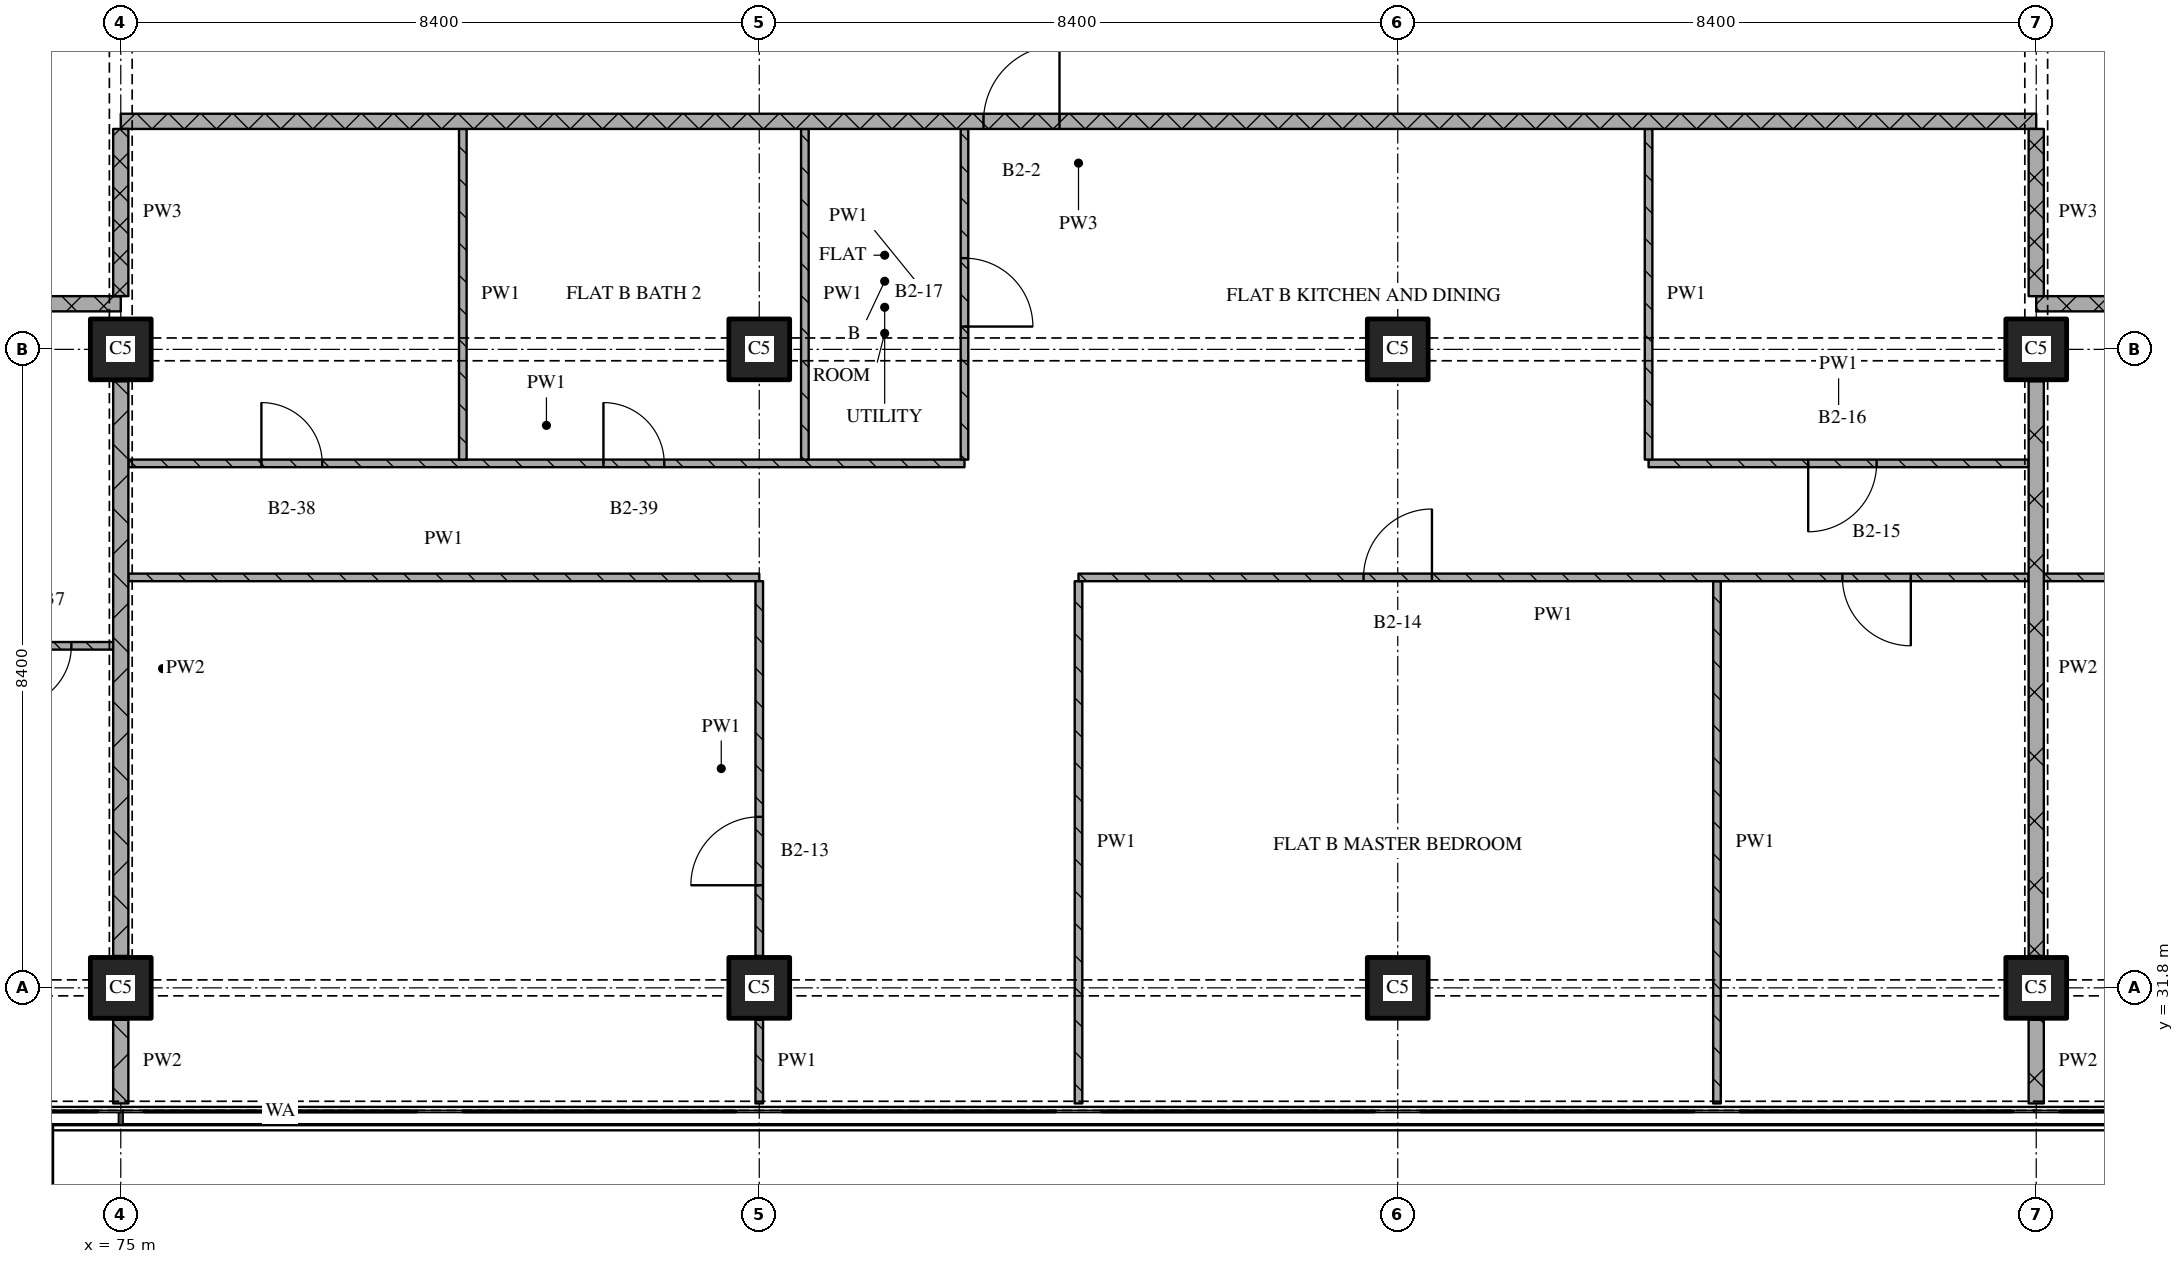
"""IFC4 building model, lengths in metres.
Left out: names, types, materials, properties, quantities, classifications, styles, units other than length and angle.
Written with IfcOpenShell. Run it as: python <this file> out.ifc"""

import sys

from ifc_helpers import new_model, si_unit, direction, frame, frame_2d, origin, origin_2d, place, context, subcontext, project, spatial, rectangle, extrude, element, fill, save


model = new_model("IFC4")
c1 = context("Model", 3, precision=1e-05, world=origin(), true_north=direction((0.0, 1.0)))
c2 = subcontext(c1, "Body", "Model", "MODEL_VIEW")
j1 = project(units=[si_unit("LENGTHUNIT", "METRE"), si_unit("PLANEANGLEUNIT", "RADIAN")], contexts=[c1])
p1 = place(None, origin())
s1 = spatial("IfcSite", under=j1, at=p1, CompositionType="ELEMENT")
p2 = place(p1, origin())
s2 = spatial("IfcBuilding", under=s1, at=p2, CompositionType="ELEMENT")
p3 = place(p2, frame((0.0, 0.0, 106.05)))
s3 = spatial("IfcBuildingStorey", under=s2, at=p3, CompositionType="ELEMENT", Elevation=106.05)
for number, where, z_axis, x_axis in (
    (1, (75.0, 31.8, 0.0), (0.0, 0.0, 1.0), (1.0, 0.0, 0.0)),
    (2, (75.0, 40.2, 0.0), (0.0, 0.0, 1.0), (1.0, 0.0, 0.0)),
    (3, (83.4, 31.8, 0.0), (0.0, 0.0, 1.0), (1.0, 0.0, 0.0)),
    (4, (83.4, 40.2, 0.0), (0.0, 0.0, 1.0), (1.0, 0.0, 0.0)),
    (5, (91.8, 31.8, 0.0), (0.0, 0.0, 1.0), (1.0, 0.0, 0.0)),
    (6, (91.8, 40.2, 0.0), (0.0, 0.0, 1.0), (1.0, 0.0, 0.0)),
    (7, (100.2, 31.8, 0.0), (0.0, 0.0, 1.0), (1.0, 0.0, 0.0)),
    (8, (100.2, 40.2, 0.0), (0.0, 0.0, 1.0), (1.0, 0.0, 0.0)),
):
    element("IfcColumn", number, at=place(p3, frame(where, z_axis=z_axis, x_axis=x_axis)), inside=s3, PredefinedType="COLUMN", context=c2, shape_type="SweptSolid", body=[
        extrude(rectangle(XDim=0.8, YDim=0.8, at=origin_2d()), origin(), (0.0, 0.0, 1.0), 3.6),
    ])
p4 = place(p3, frame((68.4, 36.3, 0.0), z_axis=(0.0, 0.0, 1.0), x_axis=(1.0, 0.0, 0.0)))
e9 = element("IfcWall", 9, at=p4, inside=s3, PredefinedType="PARTITIONING", context=c2, shape_type="SweptSolid", body=[
    extrude(rectangle(XDim=6.5, YDim=0.1, at=frame_2d((3.25, 0.0))), origin(), (0.0, 0.0, 1.0), 3.32),
])
p5 = place(p4, frame((5.15, 0.0, 0.0)))
e10 = element("IfcOpeningElement", 10, at=p5, cuts=e9, PredefinedType="OPENING", context=c2, shape_type="SweptSolid", body=[
    extrude(rectangle(XDim=0.8, YDim=2.1, at=frame_2d((0.4, 1.05))), frame((0.0, 0.06, 0.0), z_axis=(0.0, -1.0, 0.0), x_axis=(1.0, 0.0, 0.0)), (0.0, 0.0, 1.0), 0.12),
])
p6 = place(p3, frame((75.1, 37.2, 0.0), z_axis=(0.0, 0.0, 1.0), x_axis=(1.0, 0.0, 0.0)))
e11 = element("IfcWall", 11, at=p6, inside=s3, PredefinedType="PARTITIONING", context=c2, shape_type="SweptSolid", body=[
    extrude(rectangle(XDim=8.3, YDim=0.1, at=frame_2d((4.15, 0.0))), origin(), (0.0, 0.0, 1.0), 3.32),
])
p7 = place(p3, frame((75.1, 38.7, 0.0), z_axis=(0.0, 0.0, 1.0), x_axis=(1.0, 0.0, 0.0)))
e12 = element("IfcWall", 12, at=p7, inside=s3, PredefinedType="PARTITIONING", context=c2, shape_type="SweptSolid", body=[
    extrude(rectangle(XDim=11.0, YDim=0.1, at=frame_2d((5.5, 0.0))), origin(), (0.0, 0.0, 1.0), 3.32),
])
p8 = place(p7, frame((1.75, 0.0, 0.0)))
e13 = element("IfcOpeningElement", 13, at=p8, cuts=e12, PredefinedType="OPENING", context=c2, shape_type="SweptSolid", body=[
    extrude(rectangle(XDim=0.8, YDim=2.1, at=frame_2d((0.4, 1.05))), frame((0.0, 0.06, 0.0), z_axis=(0.0, -1.0, 0.0), x_axis=(1.0, 0.0, 0.0)), (0.0, 0.0, 1.0), 0.12),
])
p9 = place(p7, frame((6.25, 0.0, 0.0)))
e14 = element("IfcOpeningElement", 14, at=p9, cuts=e12, PredefinedType="OPENING", context=c2, shape_type="SweptSolid", body=[
    extrude(rectangle(XDim=0.8, YDim=2.1, at=frame_2d((0.4, 1.05))), frame((0.0, 0.06, 0.0), z_axis=(0.0, -1.0, 0.0), x_axis=(1.0, 0.0, 0.0)), (0.0, 0.0, 1.0), 0.12),
])
p10 = place(p3, frame((95.1, 38.7, 0.0), z_axis=(0.0, 0.0, 1.0), x_axis=(1.0, 0.0, 0.0)))
e15 = element("IfcWall", 15, at=p10, inside=s3, PredefinedType="PARTITIONING", context=c2, shape_type="SweptSolid", body=[
    extrude(rectangle(XDim=5.0, YDim=0.1, at=frame_2d((2.5, 0.0))), origin(), (0.0, 0.0, 1.0), 3.32),
])
p11 = place(p10, frame((2.1, 0.0, 0.0)))
e16 = element("IfcOpeningElement", 16, at=p11, cuts=e15, PredefinedType="OPENING", context=c2, shape_type="SweptSolid", body=[
    extrude(rectangle(XDim=0.9, YDim=2.1, at=frame_2d((0.45, 1.05))), frame((0.0, 0.06, 0.0), z_axis=(0.0, -1.0, 0.0), x_axis=(1.0, 0.0, 0.0)), (0.0, 0.0, 1.0), 0.12),
])
p12 = place(p3, frame((75.0, 40.8, 0.0), z_axis=(0.0, 0.0, 1.0), x_axis=(-1.0, 0.0, 0.0)))
e17 = element("IfcWall", 17, at=p12, inside=s3, PredefinedType="PARTITIONING", context=c2, shape_type="SweptSolid", body=[
    extrude(rectangle(XDim=24.18, YDim=0.2, at=frame_2d((12.09, 0.0))), origin(), (0.0, 0.0, 1.0), 3.32),
])
p13 = place(p12, frame((6.85, 0.0, 0.0)))
e18 = element("IfcOpeningElement", 18, at=p13, cuts=e17, PredefinedType="OPENING", context=c2, shape_type="SweptSolid", body=[
    extrude(rectangle(XDim=1.0, YDim=2.1, at=frame_2d((0.5, 1.05))), frame((0.0, 0.11, 0.0), z_axis=(0.0, -1.0, 0.0), x_axis=(1.0, 0.0, 0.0)), (0.0, 0.0, 1.0), 0.22),
])
p14 = place(p3, frame((124.38, 40.8, 0.0), z_axis=(0.0, 0.0, 1.0), x_axis=(-1.0, 0.0, 0.0)))
e19 = element("IfcWall", 19, at=p14, inside=s3, PredefinedType="PARTITIONING", context=c2, shape_type="SweptSolid", body=[
    extrude(rectangle(XDim=24.18, YDim=0.2, at=frame_2d((12.09, 0.0))), origin(), (0.0, 0.0, 1.0), 3.32),
])
p15 = place(p14, frame((12.13, 0.0, 0.0)))
e20 = element("IfcOpeningElement", 20, at=p15, cuts=e19, PredefinedType="OPENING", context=c2, shape_type="SweptSolid", body=[
    extrude(rectangle(XDim=1.0, YDim=2.1, at=frame_2d((0.5, 1.05))), frame((0.0, 0.11, 0.0), z_axis=(0.0, -1.0, 0.0), x_axis=(1.0, 0.0, 0.0)), (0.0, 0.0, 1.0), 0.22),
])
p16 = place(p3, frame((100.2, 43.2, 0.0), z_axis=(0.0, 0.0, 1.0), x_axis=(-1.0, 0.0, 0.0)))
e21 = element("IfcWall", 21, at=p16, inside=s3, PredefinedType="PARTITIONING", context=c2, shape_type="SweptSolid", body=[
    extrude(rectangle(XDim=25.2, YDim=0.2, at=frame_2d((12.6, 0.0))), origin(), (0.0, 0.0, 1.0), 3.32),
])
p17 = place(p16, frame((12.85, 0.0, 0.0)))
e22 = element("IfcOpeningElement", 22, at=p17, cuts=e21, PredefinedType="OPENING", context=c2, shape_type="SweptSolid", body=[
    extrude(rectangle(XDim=1.0, YDim=2.1, at=frame_2d((0.5, 1.05))), frame((0.0, 0.11, 0.0), z_axis=(0.0, -1.0, 0.0), x_axis=(1.0, 0.0, 0.0)), (0.0, 0.0, 1.0), 0.22),
])
p18 = place(p3, frame((75.0, 43.1, 0.0), z_axis=(0.0, 0.0, 1.0), x_axis=(0.0, -1.0, 0.0)))
e23 = element("IfcWall", 23, at=p18, inside=s3, PredefinedType="PARTITIONING", context=c2, shape_type="SweptSolid", body=[
    extrude(rectangle(XDim=2.2, YDim=0.2, at=frame_2d((1.1, 0.0))), origin(), (0.0, 0.0, 1.0), 2.43),
])
p19 = place(p3, frame((75.0, 31.38, 0.0), z_axis=(0.0, 0.0, 1.0), x_axis=(0.0, -1.0, 0.0)))
e24 = element("IfcWall", 24, at=p19, inside=s3, PredefinedType="PARTITIONING", context=c2, shape_type="SweptSolid", body=[
    extrude(rectangle(XDim=1.1, YDim=0.2, at=frame_2d((0.55, 0.0))), origin(), (0.0, 0.0, 1.0), 3.32),
])
p20 = place(p3, frame((75.0, 39.78, 0.0), z_axis=(0.0, 0.0, 1.0), x_axis=(0.0, -1.0, 0.0)))
e25 = element("IfcWall", 25, at=p20, inside=s3, PredefinedType="PARTITIONING", context=c2, shape_type="SweptSolid", body=[
    extrude(rectangle(XDim=7.56, YDim=0.2, at=frame_2d((3.78, 0.0))), origin(), (0.0, 0.0, 1.0), 2.83),
])
p21 = place(p3, frame((79.5, 43.1, 0.0), z_axis=(0.0, 0.0, 1.0), x_axis=(0.0, -1.0, 0.0)))
e26 = element("IfcWall", 26, at=p21, inside=s3, PredefinedType="PARTITIONING", context=c2, shape_type="SweptSolid", body=[
    extrude(rectangle(XDim=4.35, YDim=0.1, at=frame_2d((2.175, 0.0))), origin(), (0.0, 0.0, 1.0), 3.32),
])
p22 = place(p3, frame((83.4, 31.38, 0.0), z_axis=(0.0, 0.0, 1.0), x_axis=(0.0, -1.0, 0.0)))
e27 = element("IfcWall", 27, at=p22, inside=s3, PredefinedType="PARTITIONING", context=c2, shape_type="SweptSolid", body=[
    extrude(rectangle(XDim=1.1, YDim=0.1, at=frame_2d((0.55, 0.0))), origin(), (0.0, 0.0, 1.0), 3.32),
])
p23 = place(p3, frame((83.4, 32.22, 0.0), z_axis=(0.0, 0.0, 1.0), x_axis=(0.0, 1.0, 0.0)))
e28 = element("IfcWall", 28, at=p23, inside=s3, PredefinedType="PARTITIONING", context=c2, shape_type="SweptSolid", body=[
    extrude(rectangle(XDim=4.93, YDim=0.1, at=frame_2d((2.465, 0.0))), origin(), (0.0, 0.0, 1.0), 3.32),
])
p24 = place(p23, frame((0.93, 0.0, 0.0)))
e29 = element("IfcOpeningElement", 29, at=p24, cuts=e28, PredefinedType="OPENING", context=c2, shape_type="SweptSolid", body=[
    extrude(rectangle(XDim=0.9, YDim=2.1, at=frame_2d((0.45, 1.05))), frame((0.0, 0.06, 0.0), z_axis=(0.0, -1.0, 0.0), x_axis=(1.0, 0.0, 0.0)), (0.0, 0.0, 1.0), 0.12),
])
p25 = place(p3, frame((84.0, 43.1, 0.0), z_axis=(0.0, 0.0, 1.0), x_axis=(0.0, -1.0, 0.0)))
e30 = element("IfcWall", 30, at=p25, inside=s3, PredefinedType="PARTITIONING", context=c2, shape_type="SweptSolid", body=[
    extrude(rectangle(XDim=4.35, YDim=0.1, at=frame_2d((2.175, 0.0))), origin(), (0.0, 0.0, 1.0), 3.32),
])
p26 = place(p3, frame((86.1, 38.75, 0.0), z_axis=(0.0, 0.0, 1.0), x_axis=(0.0, 1.0, 0.0)))
e31 = element("IfcWall", 31, at=p26, inside=s3, PredefinedType="PARTITIONING", context=c2, shape_type="SweptSolid", body=[
    extrude(rectangle(XDim=4.35, YDim=0.1, at=frame_2d((2.175, 0.0))), origin(), (0.0, 0.0, 1.0), 3.32),
])
p27 = place(p26, frame((1.75, 0.0, 0.0)))
e32 = element("IfcOpeningElement", 32, at=p27, cuts=e31, PredefinedType="OPENING", context=c2, shape_type="SweptSolid", body=[
    extrude(rectangle(XDim=0.9, YDim=2.1, at=frame_2d((0.45, 1.05))), frame((0.0, 0.06, 0.0), z_axis=(0.0, -1.0, 0.0), x_axis=(1.0, 0.0, 0.0)), (0.0, 0.0, 1.0), 0.12),
])
p28 = place(p3, frame((87.6, 37.15, 0.0), z_axis=(0.0, 0.0, 1.0), x_axis=(0.0, -1.0, 0.0)))
e33 = element("IfcWall", 33, at=p28, inside=s3, PredefinedType="PARTITIONING", context=c2, shape_type="SweptSolid", body=[
    extrude(rectangle(XDim=6.87, YDim=0.1, at=frame_2d((3.435, 0.0))), origin(), (0.0, 0.0, 1.0), 3.32),
])
p29 = place(p3, frame((95.1, 43.1, 0.0), z_axis=(0.0, 0.0, 1.0), x_axis=(0.0, -1.0, 0.0)))
e34 = element("IfcWall", 34, at=p29, inside=s3, PredefinedType="PARTITIONING", context=c2, shape_type="SweptSolid", body=[
    extrude(rectangle(XDim=4.35, YDim=0.1, at=frame_2d((2.175, 0.0))), origin(), (0.0, 0.0, 1.0), 3.32),
])
p30 = place(p3, frame((96.0, 37.15, 0.0), z_axis=(0.0, 0.0, 1.0), x_axis=(0.0, -1.0, 0.0)))
e35 = element("IfcWall", 35, at=p30, inside=s3, PredefinedType="PARTITIONING", context=c2, shape_type="SweptSolid", body=[
    extrude(rectangle(XDim=6.87, YDim=0.1, at=frame_2d((3.435, 0.0))), origin(), (0.0, 0.0, 1.0), 3.32),
])
p31 = place(p3, frame((100.2, 43.1, 0.0), z_axis=(0.0, 0.0, 1.0), x_axis=(0.0, -1.0, 0.0)))
e36 = element("IfcWall", 36, at=p31, inside=s3, PredefinedType="PARTITIONING", context=c2, shape_type="SweptSolid", body=[
    extrude(rectangle(XDim=2.2, YDim=0.2, at=frame_2d((1.1, 0.0))), origin(), (0.0, 0.0, 1.0), 2.43),
])
p32 = place(p3, frame((100.2, 31.38, 0.0), z_axis=(0.0, 0.0, 1.0), x_axis=(0.0, -1.0, 0.0)))
e37 = element("IfcWall", 37, at=p32, inside=s3, PredefinedType="PARTITIONING", context=c2, shape_type="SweptSolid", body=[
    extrude(rectangle(XDim=1.1, YDim=0.2, at=frame_2d((0.55, 0.0))), origin(), (0.0, 0.0, 1.0), 3.32),
])
p33 = place(p3, frame((100.2, 39.78, 0.0), z_axis=(0.0, 0.0, 1.0), x_axis=(0.0, -1.0, 0.0)))
e38 = element("IfcWall", 38, at=p33, inside=s3, PredefinedType="PARTITIONING", context=c2, shape_type="SweptSolid", body=[
    extrude(rectangle(XDim=7.56, YDim=0.2, at=frame_2d((3.78, 0.0))), origin(), (0.0, 0.0, 1.0), 2.83),
])
p34 = place(p3, frame((100.1, 37.2, 0.0), z_axis=(0.0, 0.0, 1.0), x_axis=(-1.0, 0.0, 0.0)))
e39 = element("IfcWall", 39, at=p34, inside=s3, PredefinedType="PARTITIONING", context=c2, shape_type="SweptSolid", body=[
    extrude(rectangle(XDim=12.5, YDim=0.1, at=frame_2d((6.25, 0.0))), origin(), (0.0, 0.0, 1.0), 3.32),
])
p35 = place(p34, frame((1.55, 0.0, 0.0)))
e40 = element("IfcOpeningElement", 40, at=p35, cuts=e39, PredefinedType="OPENING", context=c2, shape_type="SweptSolid", body=[
    extrude(rectangle(XDim=0.9, YDim=2.1, at=frame_2d((0.45, 1.05))), frame((0.0, 0.06, 0.0), z_axis=(0.0, -1.0, 0.0), x_axis=(1.0, 0.0, 0.0)), (0.0, 0.0, 1.0), 0.12),
])
p36 = place(p34, frame((7.85, 0.0, 0.0)))
e41 = element("IfcOpeningElement", 41, at=p36, cuts=e39, PredefinedType="OPENING", context=c2, shape_type="SweptSolid", body=[
    extrude(rectangle(XDim=0.9, YDim=2.1, at=frame_2d((0.45, 1.05))), frame((0.0, 0.06, 0.0), z_axis=(0.0, -1.0, 0.0), x_axis=(1.0, 0.0, 0.0)), (0.0, 0.0, 1.0), 0.12),
])
p37 = place(p3, frame((100.3, 37.2, 0.0), z_axis=(0.0, 0.0, 1.0), x_axis=(1.0, 0.0, 0.0)))
e42 = element("IfcWall", 42, at=p37, inside=s3, PredefinedType="PARTITIONING", context=c2, shape_type="SweptSolid", body=[
    extrude(rectangle(XDim=10.7, YDim=0.1, at=frame_2d((5.35, 0.0))), origin(), (0.0, 0.0, 1.0), 3.32),
])
p38 = place(p37, frame((1.75, 0.0, 0.0)))
e43 = element("IfcOpeningElement", 43, at=p38, cuts=e42, PredefinedType="OPENING", context=c2, shape_type="SweptSolid", body=[
    extrude(rectangle(XDim=0.8, YDim=2.1, at=frame_2d((0.4, 1.05))), frame((0.0, 0.06, 0.0), z_axis=(0.0, -1.0, 0.0), x_axis=(1.0, 0.0, 0.0)), (0.0, 0.0, 1.0), 0.12),
])
p39 = place(p37, frame((6.25, 0.0, 0.0)))
e44 = element("IfcOpeningElement", 44, at=p39, cuts=e42, PredefinedType="OPENING", context=c2, shape_type="SweptSolid", body=[
    extrude(rectangle(XDim=0.8, YDim=2.1, at=frame_2d((0.4, 1.05))), frame((0.0, 0.06, 0.0), z_axis=(0.0, -1.0, 0.0), x_axis=(1.0, 0.0, 0.0)), (0.0, 0.0, 1.0), 0.12),
])
p40 = place(p37, frame((9.35, 0.0, 0.0)))
e45 = element("IfcOpeningElement", 45, at=p40, cuts=e42, PredefinedType="OPENING", context=c2, shape_type="SweptSolid", body=[
    extrude(rectangle(XDim=0.9, YDim=2.1, at=frame_2d((0.45, 1.05))), frame((0.0, 0.06, 0.0), z_axis=(0.0, -1.0, 0.0), x_axis=(1.0, 0.0, 0.0)), (0.0, 0.0, 1.0), 0.12),
])
p41 = place(p5, origin())
e46 = element("IfcDoor", 46, at=p41, inside=s3, OperationType="SINGLE_SWING_RIGHT", PredefinedType="DOOR", context=c2, shape_type="SweptSolid", body=[
    extrude(rectangle(XDim=0.8, YDim=2.1, at=frame_2d((0.4, 1.05))), frame((0.0, 0.025, 0.0), z_axis=(0.0, -1.0, 0.0), x_axis=(1.0, 0.0, 0.0)), (0.0, 0.0, 1.0), 0.05),
])
fill(e10, e46)
p42 = place(p8, origin())
e47 = element("IfcDoor", 47, at=p42, inside=s3, OperationType="SINGLE_SWING_LEFT", PredefinedType="DOOR", context=c2, shape_type="SweptSolid", body=[
    extrude(rectangle(XDim=0.8, YDim=2.1, at=frame_2d((0.4, 1.05))), frame((0.0, 0.025, 0.0), z_axis=(0.0, -1.0, 0.0), x_axis=(1.0, 0.0, 0.0)), (0.0, 0.0, 1.0), 0.05),
])
fill(e13, e47)
p43 = place(p9, origin())
e48 = element("IfcDoor", 48, at=p43, inside=s3, OperationType="SINGLE_SWING_LEFT", PredefinedType="DOOR", context=c2, shape_type="SweptSolid", body=[
    extrude(rectangle(XDim=0.8, YDim=2.1, at=frame_2d((0.4, 1.05))), frame((0.0, 0.025, 0.0), z_axis=(0.0, -1.0, 0.0), x_axis=(1.0, 0.0, 0.0)), (0.0, 0.0, 1.0), 0.05),
])
fill(e14, e48)
p44 = place(p11, origin())
e49 = element("IfcDoor", 49, at=p44, inside=s3, OperationType="SINGLE_SWING_RIGHT", PredefinedType="DOOR", context=c2, shape_type="SweptSolid", body=[
    extrude(rectangle(XDim=0.9, YDim=2.1, at=frame_2d((0.45, 1.05))), frame((0.0, 0.025, 0.0), z_axis=(0.0, -1.0, 0.0), x_axis=(1.0, 0.0, 0.0)), (0.0, 0.0, 1.0), 0.05),
])
fill(e16, e49)
p45 = place(p17, origin())
e50 = element("IfcDoor", 50, at=p45, inside=s3, OperationType="SINGLE_SWING_RIGHT", PredefinedType="DOOR", context=c2, shape_type="SweptSolid", body=[
    extrude(rectangle(XDim=1.0, YDim=2.1, at=frame_2d((0.5, 1.05))), frame((0.0, 0.025, 0.0), z_axis=(0.0, -1.0, 0.0), x_axis=(1.0, 0.0, 0.0)), (0.0, 0.0, 1.0), 0.05),
])
fill(e22, e50)
p46 = place(p24, origin())
e51 = element("IfcDoor", 51, at=p46, inside=s3, OperationType="SINGLE_SWING_LEFT", PredefinedType="DOOR", context=c2, shape_type="SweptSolid", body=[
    extrude(rectangle(XDim=0.9, YDim=2.1, at=frame_2d((0.45, 1.05))), frame((0.0, 0.025, 0.0), z_axis=(0.0, -1.0, 0.0), x_axis=(1.0, 0.0, 0.0)), (0.0, 0.0, 1.0), 0.05),
])
fill(e29, e51)
p47 = place(p27, origin())
e52 = element("IfcDoor", 52, at=p47, inside=s3, OperationType="SINGLE_SWING_RIGHT", PredefinedType="DOOR", context=c2, shape_type="SweptSolid", body=[
    extrude(rectangle(XDim=0.9, YDim=2.1, at=frame_2d((0.45, 1.05))), frame((0.0, 0.025, 0.0), z_axis=(0.0, -1.0, 0.0), x_axis=(1.0, 0.0, 0.0)), (0.0, 0.0, 1.0), 0.05),
])
fill(e32, e52)
p48 = place(p35, origin())
e53 = element("IfcDoor", 53, at=p48, inside=s3, OperationType="SINGLE_SWING_LEFT", PredefinedType="DOOR", context=c2, shape_type="SweptSolid", body=[
    extrude(rectangle(XDim=0.9, YDim=2.1, at=frame_2d((0.45, 1.05))), frame((0.0, 0.025, 0.0), z_axis=(0.0, -1.0, 0.0), x_axis=(1.0, 0.0, 0.0)), (0.0, 0.0, 1.0), 0.05),
])
fill(e40, e53)
p49 = place(p36, origin())
e54 = element("IfcDoor", 54, at=p49, inside=s3, OperationType="SINGLE_SWING_RIGHT", PredefinedType="DOOR", context=c2, shape_type="SweptSolid", body=[
    extrude(rectangle(XDim=0.9, YDim=2.1, at=frame_2d((0.45, 1.05))), frame((0.0, 0.025, 0.0), z_axis=(0.0, -1.0, 0.0), x_axis=(1.0, 0.0, 0.0)), (0.0, 0.0, 1.0), 0.05),
])
fill(e41, e54)
save(model, sys.argv[1])
